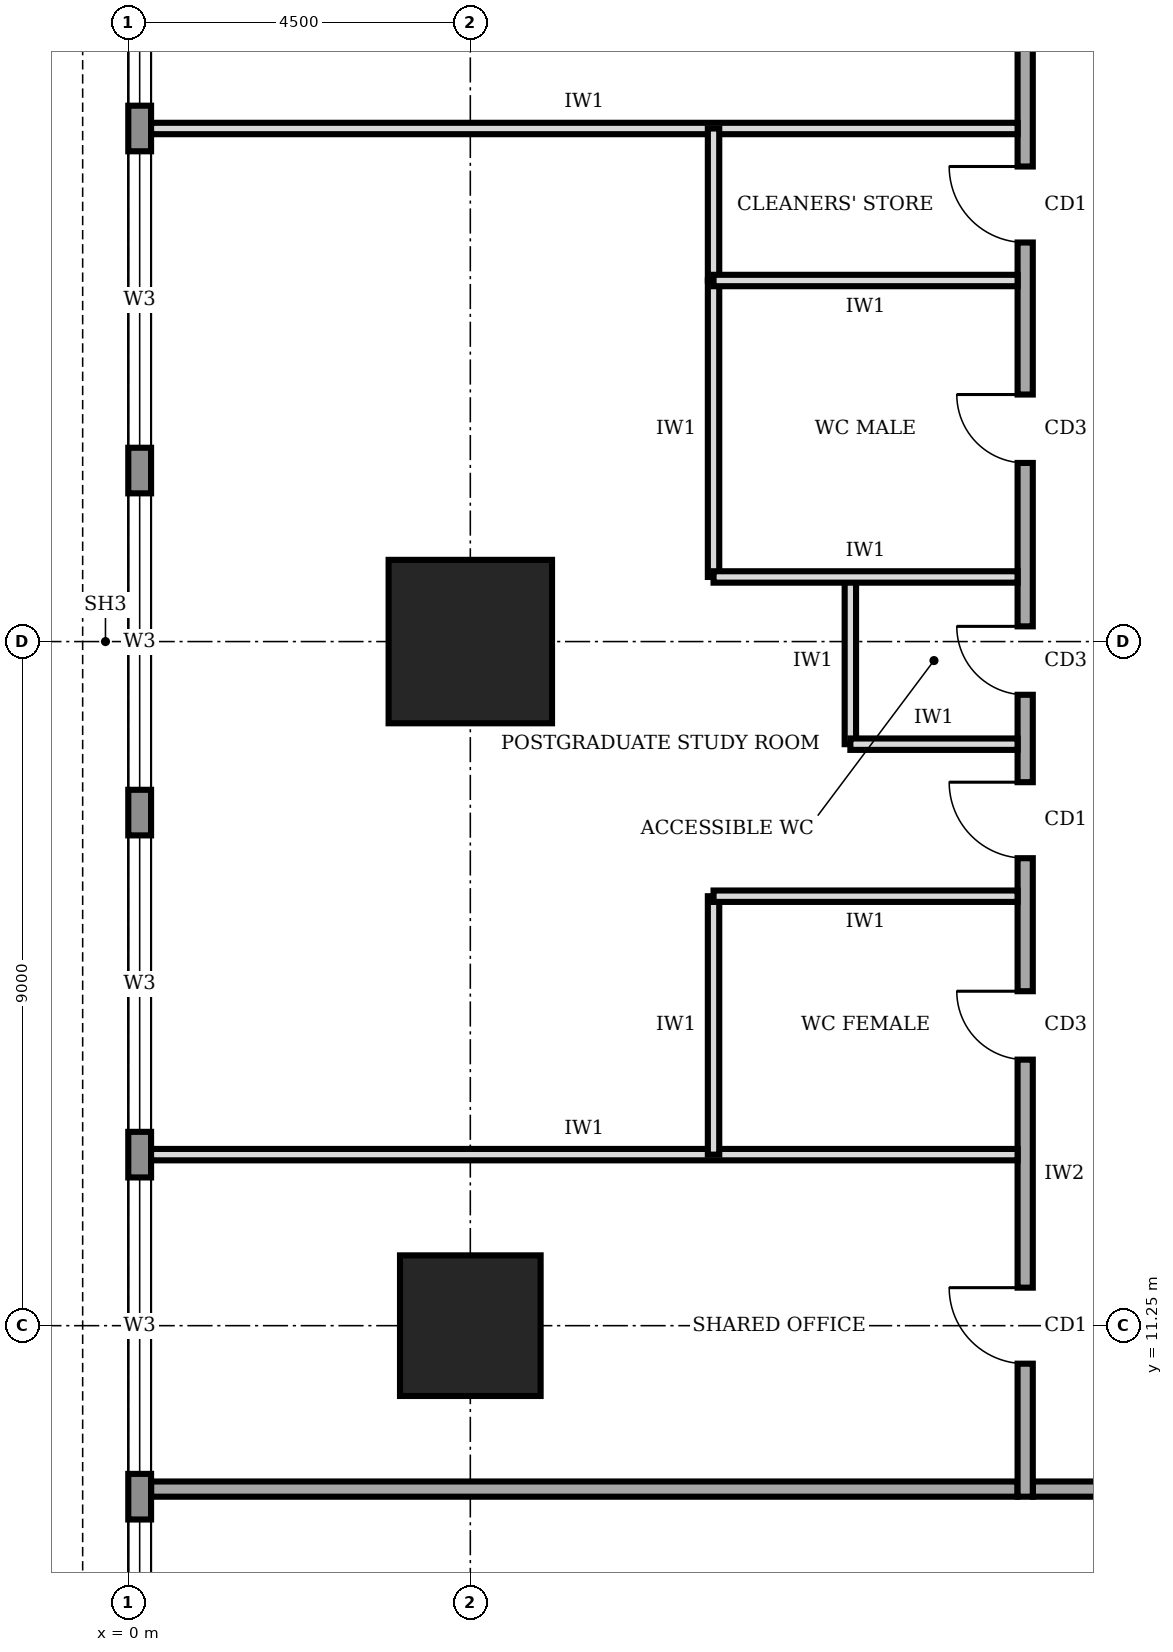
"""IFC4 building model, lengths in metres.
Left out: names, types, materials, properties, quantities, classifications, styles, units other than length and angle.
Written with IfcOpenShell. Run it as: python <this file> out.ifc"""

import sys

from ifc_helpers import new_model, si_unit, direction, frame, frame_2d, origin, origin_2d, place, context, subcontext, project, spatial, rectangle, extrude, element, fill, save


model = new_model("IFC4")
c1 = context("Model", 3, precision=1e-05, world=origin(), true_north=direction((0.0, 1.0)))
c2 = subcontext(c1, "Body", "Model", "MODEL_VIEW")
j1 = project(units=[si_unit("LENGTHUNIT", "METRE"), si_unit("PLANEANGLEUNIT", "RADIAN")], contexts=[c1])
p1 = place(None, origin())
s1 = spatial("IfcSite", under=j1, at=p1, CompositionType="ELEMENT")
p2 = place(p1, origin())
s2 = spatial("IfcBuilding", under=s1, at=p2, CompositionType="ELEMENT")
p3 = place(p2, frame((0.0, 0.0, 253.0)))
s3 = spatial("IfcBuildingStorey", under=s2, at=p3, CompositionType="ELEMENT", Elevation=253.0)
p4 = place(p3, frame((4.5, 11.25, 0.0), z_axis=(0.0, 0.0, 1.0), x_axis=(1.0, 0.0, 0.0)))
e1 = element("IfcColumn", 1, at=p4, inside=s3, PredefinedType="COLUMN", context=c2, shape_type="SweptSolid", body=[
    extrude(rectangle(XDim=1.85, YDim=1.85, at=origin_2d()), origin(), (0.0, 0.0, 1.0), 4.0),
])
p5 = place(p3, frame((4.5, 20.25, 0.0), z_axis=(0.0, 0.0, 1.0), x_axis=(1.0, 0.0, 0.0)))
e2 = element("IfcColumn", 2, at=p5, inside=s3, PredefinedType="COLUMN", context=c2, shape_type="SweptSolid", body=[
    extrude(rectangle(XDim=2.15, YDim=2.15, at=origin_2d()), origin(), (0.0, 0.0, 1.0), 4.0),
])
p6 = place(p3, frame((0.15, 35.98, 0.0), z_axis=(0.0, 0.0, 1.0), x_axis=(0.0, -1.0, 0.0)))
e3 = element("IfcWall", 3, at=p6, inside=s3, PredefinedType="STANDARD", context=c2, shape_type="SweptSolid", body=[
    extrude(rectangle(XDim=31.46, YDim=0.3, at=frame_2d((15.73, 0.0))), origin(), (0.0, 0.0, 1.0), 3.75),
])
p7 = place(p6, frame((27.28, 0.0, 0.95)))
e4 = element("IfcOpeningElement", 4, at=p7, cuts=e3, PredefinedType="OPENING", context=c2, shape_type="SweptSolid", body=[
    extrude(rectangle(XDim=3.9, YDim=1.8, at=frame_2d((1.95, 0.9))), frame((0.0, 0.16, 0.0), z_axis=(0.0, -1.0, 0.0), x_axis=(1.0, 0.0, 0.0)), (0.0, 0.0, 1.0), 0.32),
])
p8 = place(p6, frame((22.78, 0.0, 0.95)))
e5 = element("IfcOpeningElement", 5, at=p8, cuts=e3, PredefinedType="OPENING", context=c2, shape_type="SweptSolid", body=[
    extrude(rectangle(XDim=3.9, YDim=1.8, at=frame_2d((1.95, 0.9))), frame((0.0, 0.16, 0.0), z_axis=(0.0, -1.0, 0.0), x_axis=(1.0, 0.0, 0.0)), (0.0, 0.0, 1.0), 0.32),
])
p9 = place(p6, frame((18.28, 0.0, 0.95)))
e6 = element("IfcOpeningElement", 6, at=p9, cuts=e3, PredefinedType="OPENING", context=c2, shape_type="SweptSolid", body=[
    extrude(rectangle(XDim=3.9, YDim=1.8, at=frame_2d((1.95, 0.9))), frame((0.0, 0.16, 0.0), z_axis=(0.0, -1.0, 0.0), x_axis=(1.0, 0.0, 0.0)), (0.0, 0.0, 1.0), 0.32),
])
p10 = place(p6, frame((13.78, 0.0, 0.95)))
e7 = element("IfcOpeningElement", 7, at=p10, cuts=e3, PredefinedType="OPENING", context=c2, shape_type="SweptSolid", body=[
    extrude(rectangle(XDim=3.9, YDim=1.8, at=frame_2d((1.95, 0.9))), frame((0.0, 0.16, 0.0), z_axis=(0.0, -1.0, 0.0), x_axis=(1.0, 0.0, 0.0)), (0.0, 0.0, 1.0), 0.32),
])
p11 = place(p6, frame((9.28, 0.0, 0.95)))
e8 = element("IfcOpeningElement", 8, at=p11, cuts=e3, PredefinedType="OPENING", context=c2, shape_type="SweptSolid", body=[
    extrude(rectangle(XDim=3.9, YDim=1.8, at=frame_2d((1.95, 0.9))), frame((0.0, 0.16, 0.0), z_axis=(0.0, -1.0, 0.0), x_axis=(1.0, 0.0, 0.0)), (0.0, 0.0, 1.0), 0.32),
])
p12 = place(p6, frame((4.78, 0.0, 0.95)))
e9 = element("IfcOpeningElement", 9, at=p12, cuts=e3, PredefinedType="OPENING", context=c2, shape_type="SweptSolid", body=[
    extrude(rectangle(XDim=3.9, YDim=1.8, at=frame_2d((1.95, 0.9))), frame((0.0, 0.16, 0.0), z_axis=(0.0, -1.0, 0.0), x_axis=(1.0, 0.0, 0.0)), (0.0, 0.0, 1.0), 0.32),
])
p13 = place(p3, frame((11.9, 9.1, 0.0), z_axis=(0.0, 0.0, 1.0), x_axis=(1.0, 0.0, 0.0)))
e10 = element("IfcWall", 10, at=p13, inside=s3, PredefinedType="SOLIDWALL", context=c2, shape_type="SweptSolid", body=[
    extrude(rectangle(XDim=16.9, YDim=0.2, at=frame_2d((8.45, 0.0))), origin(), (0.0, 0.0, 1.0), 3.75),
])
p14 = place(p13, frame((2.25, 0.0, 0.0)))
e11 = element("IfcOpeningElement", 11, at=p14, cuts=e10, PredefinedType="OPENING", context=c2, shape_type="SweptSolid", body=[
    extrude(rectangle(XDim=1.4, YDim=2.1, at=frame_2d((0.7, 1.05))), frame((0.0, 0.11, 0.0), z_axis=(0.0, -1.0, 0.0), x_axis=(1.0, 0.0, 0.0)), (0.0, 0.0, 1.0), 0.22),
])
p15 = place(p13, frame((10.8, 0.0, 0.0)))
e12 = element("IfcOpeningElement", 12, at=p15, cuts=e10, PredefinedType="OPENING", context=c2, shape_type="SweptSolid", body=[
    extrude(rectangle(XDim=1.4, YDim=2.1, at=frame_2d((0.7, 1.05))), frame((0.0, 0.11, 0.0), z_axis=(0.0, -1.0, 0.0), x_axis=(1.0, 0.0, 0.0)), (0.0, 0.0, 1.0), 0.22),
])
p16 = place(p3, frame((11.8, 31.3, 0.0), z_axis=(0.0, 0.0, 1.0), x_axis=(0.0, -1.0, 0.0)))
e13 = element("IfcWall", 13, at=p16, inside=s3, PredefinedType="SOLIDWALL", context=c2, shape_type="SweptSolid", body=[
    extrude(rectangle(XDim=22.3, YDim=0.2, at=frame_2d((11.15, 0.0))), origin(), (0.0, 0.0, 1.0), 3.75),
])
p17 = place(p16, frame((19.55, 0.0, 0.0)))
e14 = element("IfcOpeningElement", 14, at=p17, cuts=e13, PredefinedType="OPENING", context=c2, shape_type="SweptSolid", body=[
    extrude(rectangle(XDim=1.0, YDim=2.1, at=frame_2d((0.5, 1.05))), frame((0.0, 0.11, 0.0), z_axis=(0.0, -1.0, 0.0), x_axis=(1.0, 0.0, 0.0)), (0.0, 0.0, 1.0), 0.22),
])
p18 = place(p16, frame((15.65, 0.0, 0.0)))
e15 = element("IfcOpeningElement", 15, at=p18, cuts=e13, PredefinedType="OPENING", context=c2, shape_type="SweptSolid", body=[
    extrude(rectangle(XDim=0.9, YDim=2.1, at=frame_2d((0.45, 1.05))), frame((0.0, 0.11, 0.0), z_axis=(0.0, -1.0, 0.0), x_axis=(1.0, 0.0, 0.0)), (0.0, 0.0, 1.0), 0.22),
])
p19 = place(p16, frame((10.85, 0.0, 0.0)))
e16 = element("IfcOpeningElement", 16, at=p19, cuts=e13, PredefinedType="OPENING", context=c2, shape_type="SweptSolid", body=[
    extrude(rectangle(XDim=0.9, YDim=2.1, at=frame_2d((0.45, 1.05))), frame((0.0, 0.11, 0.0), z_axis=(0.0, -1.0, 0.0), x_axis=(1.0, 0.0, 0.0)), (0.0, 0.0, 1.0), 0.22),
])
p20 = place(p16, frame((7.8, 0.0, 0.0)))
e17 = element("IfcOpeningElement", 17, at=p20, cuts=e13, PredefinedType="OPENING", context=c2, shape_type="SweptSolid", body=[
    extrude(rectangle(XDim=0.9, YDim=2.1, at=frame_2d((0.45, 1.05))), frame((0.0, 0.11, 0.0), z_axis=(0.0, -1.0, 0.0), x_axis=(1.0, 0.0, 0.0)), (0.0, 0.0, 1.0), 0.22),
])
p21 = place(p16, frame((4.8, 0.0, 0.0)))
e18 = element("IfcOpeningElement", 18, at=p21, cuts=e13, PredefinedType="OPENING", context=c2, shape_type="SweptSolid", body=[
    extrude(rectangle(XDim=1.0, YDim=2.1, at=frame_2d((0.5, 1.05))), frame((0.0, 0.11, 0.0), z_axis=(0.0, -1.0, 0.0), x_axis=(1.0, 0.0, 0.0)), (0.0, 0.0, 1.0), 0.22),
])
p22 = place(p16, frame((12.9, 0.0, 0.0)))
e19 = element("IfcOpeningElement", 19, at=p22, cuts=e13, PredefinedType="OPENING", context=c2, shape_type="SweptSolid", body=[
    extrude(rectangle(XDim=1.0, YDim=2.1, at=frame_2d((0.5, 1.05))), frame((0.0, 0.11, 0.0), z_axis=(0.0, -1.0, 0.0), x_axis=(1.0, 0.0, 0.0)), (0.0, 0.0, 1.0), 0.22),
])
p23 = place(p16, frame((1.55, 0.0, 0.0)))
e20 = element("IfcOpeningElement", 20, at=p23, cuts=e13, PredefinedType="OPENING", context=c2, shape_type="SweptSolid", body=[
    extrude(rectangle(XDim=1.0, YDim=2.1, at=frame_2d((0.5, 1.05))), frame((0.0, 0.11, 0.0), z_axis=(0.0, -1.0, 0.0), x_axis=(1.0, 0.0, 0.0)), (0.0, 0.0, 1.0), 0.22),
])
p24 = place(p3, frame((0.3, 9.1, 0.0), z_axis=(0.0, 0.0, 1.0), x_axis=(1.0, 0.0, 0.0)))
e21 = element("IfcWall", 21, at=p24, inside=s3, PredefinedType="SOLIDWALL", context=c2, shape_type="SweptSolid", body=[
    extrude(rectangle(XDim=11.4, YDim=0.2, at=frame_2d((5.7, 0.0))), origin(), (0.0, 0.0, 1.0), 3.75),
])
for number, where, z_axis, x_axis in (
    (22, (0.3, 13.5, 0.0), (0.0, 0.0, 1.0), (1.0, 0.0, 0.0)),
    (23, (0.3, 27.0, 0.0), (0.0, 0.0, 1.0), (1.0, 0.0, 0.0)),
):
    element("IfcWall", number, at=place(p3, frame(where, z_axis=z_axis, x_axis=x_axis)), inside=s3, PredefinedType="PARTITIONING", context=c2, shape_type="SweptSolid", body=[
        extrude(rectangle(XDim=11.4, YDim=0.15, at=frame_2d((5.7, 0.0))), origin(), (0.0, 0.0, 1.0), 3.75),
    ])
p25 = place(p3, frame((11.7, 16.9, 0.0), z_axis=(0.0, 0.0, 1.0), x_axis=(-1.0, 0.0, 0.0)))
e24 = element("IfcWall", 24, at=p25, inside=s3, PredefinedType="PARTITIONING", context=c2, shape_type="SweptSolid", body=[
    extrude(rectangle(XDim=4.0, YDim=0.15, at=frame_2d((2.0, 0.0))), origin(), (0.0, 0.0, 1.0), 3.75),
])
p26 = place(p3, frame((11.7, 18.9, 0.0), z_axis=(0.0, 0.0, 1.0), x_axis=(-1.0, 0.0, 0.0)))
e25 = element("IfcWall", 25, at=p26, inside=s3, PredefinedType="PARTITIONING", context=c2, shape_type="SweptSolid", body=[
    extrude(rectangle(XDim=2.2, YDim=0.15, at=frame_2d((1.1, 0.0))), origin(), (0.0, 0.0, 1.0), 3.75),
])
p27 = place(p3, frame((11.7, 21.1, 0.0), z_axis=(0.0, 0.0, 1.0), x_axis=(-1.0, 0.0, 0.0)))
e26 = element("IfcWall", 26, at=p27, inside=s3, PredefinedType="PARTITIONING", context=c2, shape_type="SweptSolid", body=[
    extrude(rectangle(XDim=4.0, YDim=0.15, at=frame_2d((2.0, 0.0))), origin(), (0.0, 0.0, 1.0), 2.85),
])
p28 = place(p3, frame((11.7, 25.0, 0.0), z_axis=(0.0, 0.0, 1.0), x_axis=(-1.0, 0.0, 0.0)))
e27 = element("IfcWall", 27, at=p28, inside=s3, PredefinedType="PARTITIONING", context=c2, shape_type="SweptSolid", body=[
    extrude(rectangle(XDim=4.0, YDim=0.15, at=frame_2d((2.0, 0.0))), origin(), (0.0, 0.0, 1.0), 3.75),
])
p29 = place(p3, frame((7.7, 13.5, 0.0), z_axis=(0.0, 0.0, 1.0), x_axis=(0.0, 1.0, 0.0)))
e28 = element("IfcWall", 28, at=p29, inside=s3, PredefinedType="PARTITIONING", context=c2, shape_type="SweptSolid", body=[
    extrude(rectangle(XDim=3.4, YDim=0.15, at=frame_2d((1.7, 0.0))), origin(), (0.0, 0.0, 1.0), 3.75),
])
p30 = place(p3, frame((9.5, 18.9, 0.0), z_axis=(0.0, 0.0, 1.0), x_axis=(0.0, 1.0, 0.0)))
e29 = element("IfcWall", 29, at=p30, inside=s3, PredefinedType="PARTITIONING", context=c2, shape_type="SweptSolid", body=[
    extrude(rectangle(XDim=2.2, YDim=0.15, at=frame_2d((1.1, 0.0))), origin(), (0.0, 0.0, 1.0), 3.75),
])
p31 = place(p3, frame((7.7, 21.1, 0.0), z_axis=(0.0, 0.0, 1.0), x_axis=(0.0, 1.0, 0.0)))
e30 = element("IfcWall", 30, at=p31, inside=s3, PredefinedType="PARTITIONING", context=c2, shape_type="SweptSolid", body=[
    extrude(rectangle(XDim=3.9, YDim=0.15, at=frame_2d((1.95, 0.0))), origin(), (0.0, 0.0, 1.0), 3.75),
])
p32 = place(p3, frame((7.7, 25.0, 0.0), z_axis=(0.0, 0.0, 1.0), x_axis=(0.0, 1.0, 0.0)))
e31 = element("IfcWall", 31, at=p32, inside=s3, PredefinedType="PARTITIONING", context=c2, shape_type="SweptSolid", body=[
    extrude(rectangle(XDim=2.0, YDim=0.15, at=frame_2d((1.0, 0.0))), origin(), (0.0, 0.0, 1.0), 3.75),
])
p33 = place(p7, origin())
e32 = element("IfcWindow", 32, at=p33, inside=s3, PartitioningType="SINGLE_PANEL", PredefinedType="WINDOW", context=c2, shape_type="SweptSolid", body=[
    extrude(rectangle(XDim=3.9, YDim=1.8, at=frame_2d((1.95, 0.9))), frame((0.0, 0.03, 0.0), z_axis=(0.0, -1.0, 0.0), x_axis=(1.0, 0.0, 0.0)), (0.0, 0.0, 1.0), 0.06),
])
fill(e4, e32)
p34 = place(p8, origin())
e33 = element("IfcWindow", 33, at=p34, inside=s3, PartitioningType="SINGLE_PANEL", PredefinedType="WINDOW", context=c2, shape_type="SweptSolid", body=[
    extrude(rectangle(XDim=3.9, YDim=1.8, at=frame_2d((1.95, 0.9))), frame((0.0, 0.03, 0.0), z_axis=(0.0, -1.0, 0.0), x_axis=(1.0, 0.0, 0.0)), (0.0, 0.0, 1.0), 0.06),
])
fill(e5, e33)
p35 = place(p9, origin())
e34 = element("IfcWindow", 34, at=p35, inside=s3, PartitioningType="SINGLE_PANEL", PredefinedType="WINDOW", context=c2, shape_type="SweptSolid", body=[
    extrude(rectangle(XDim=3.9, YDim=1.8, at=frame_2d((1.95, 0.9))), frame((0.0, 0.03, 0.0), z_axis=(0.0, -1.0, 0.0), x_axis=(1.0, 0.0, 0.0)), (0.0, 0.0, 1.0), 0.06),
])
fill(e6, e34)
p36 = place(p10, origin())
e35 = element("IfcWindow", 35, at=p36, inside=s3, PartitioningType="SINGLE_PANEL", PredefinedType="WINDOW", context=c2, shape_type="SweptSolid", body=[
    extrude(rectangle(XDim=3.9, YDim=1.8, at=frame_2d((1.95, 0.9))), frame((0.0, 0.03, 0.0), z_axis=(0.0, -1.0, 0.0), x_axis=(1.0, 0.0, 0.0)), (0.0, 0.0, 1.0), 0.06),
])
fill(e7, e35)
p37 = place(p11, origin())
e36 = element("IfcWindow", 36, at=p37, inside=s3, PartitioningType="SINGLE_PANEL", PredefinedType="WINDOW", context=c2, shape_type="SweptSolid", body=[
    extrude(rectangle(XDim=3.9, YDim=1.8, at=frame_2d((1.95, 0.9))), frame((0.0, 0.03, 0.0), z_axis=(0.0, -1.0, 0.0), x_axis=(1.0, 0.0, 0.0)), (0.0, 0.0, 1.0), 0.06),
])
fill(e8, e36)
p38 = place(p12, origin())
e37 = element("IfcWindow", 37, at=p38, inside=s3, PartitioningType="SINGLE_PANEL", PredefinedType="WINDOW", context=c2, shape_type="SweptSolid", body=[
    extrude(rectangle(XDim=3.9, YDim=1.8, at=frame_2d((1.95, 0.9))), frame((0.0, 0.03, 0.0), z_axis=(0.0, -1.0, 0.0), x_axis=(1.0, 0.0, 0.0)), (0.0, 0.0, 1.0), 0.06),
])
fill(e9, e37)
p39 = place(p17, frame((1.0, 0.0, 0.0), z_axis=(0.0, 0.0, 1.0), x_axis=(-1.0, 0.0, 0.0)))
e38 = element("IfcDoor", 38, at=p39, inside=s3, OperationType="SINGLE_SWING_RIGHT", PredefinedType="DOOR", context=c2, shape_type="SweptSolid", body=[
    extrude(rectangle(XDim=1.0, YDim=2.1, at=frame_2d((0.5, 1.05))), frame((0.0, 0.025, 0.0), z_axis=(0.0, -1.0, 0.0), x_axis=(1.0, 0.0, 0.0)), (0.0, 0.0, 1.0), 0.05),
])
fill(e14, e38)
p40 = place(p18, frame((0.9, 0.0, 0.0), z_axis=(0.0, 0.0, 1.0), x_axis=(-1.0, 0.0, 0.0)))
e39 = element("IfcDoor", 39, at=p40, inside=s3, OperationType="SINGLE_SWING_RIGHT", PredefinedType="DOOR", context=c2, shape_type="SweptSolid", body=[
    extrude(rectangle(XDim=0.9, YDim=2.1, at=frame_2d((0.45, 1.05))), frame((0.0, 0.025, 0.0), z_axis=(0.0, -1.0, 0.0), x_axis=(1.0, 0.0, 0.0)), (0.0, 0.0, 1.0), 0.05),
])
fill(e15, e39)
p41 = place(p19, frame((0.9, 0.0, 0.0), z_axis=(0.0, 0.0, 1.0), x_axis=(-1.0, 0.0, 0.0)))
e40 = element("IfcDoor", 40, at=p41, inside=s3, OperationType="SINGLE_SWING_RIGHT", PredefinedType="DOOR", context=c2, shape_type="SweptSolid", body=[
    extrude(rectangle(XDim=0.9, YDim=2.1, at=frame_2d((0.45, 1.05))), frame((0.0, 0.025, 0.0), z_axis=(0.0, -1.0, 0.0), x_axis=(1.0, 0.0, 0.0)), (0.0, 0.0, 1.0), 0.05),
])
fill(e16, e40)
p42 = place(p20, frame((0.9, 0.0, 0.0), z_axis=(0.0, 0.0, 1.0), x_axis=(-1.0, 0.0, 0.0)))
e41 = element("IfcDoor", 41, at=p42, inside=s3, OperationType="SINGLE_SWING_RIGHT", PredefinedType="DOOR", context=c2, shape_type="SweptSolid", body=[
    extrude(rectangle(XDim=0.9, YDim=2.1, at=frame_2d((0.45, 1.05))), frame((0.0, 0.025, 0.0), z_axis=(0.0, -1.0, 0.0), x_axis=(1.0, 0.0, 0.0)), (0.0, 0.0, 1.0), 0.05),
])
fill(e17, e41)
p43 = place(p21, frame((1.0, 0.0, 0.0), z_axis=(0.0, 0.0, 1.0), x_axis=(-1.0, 0.0, 0.0)))
e42 = element("IfcDoor", 42, at=p43, inside=s3, OperationType="SINGLE_SWING_RIGHT", PredefinedType="DOOR", context=c2, shape_type="SweptSolid", body=[
    extrude(rectangle(XDim=1.0, YDim=2.1, at=frame_2d((0.5, 1.05))), frame((0.0, 0.025, 0.0), z_axis=(0.0, -1.0, 0.0), x_axis=(1.0, 0.0, 0.0)), (0.0, 0.0, 1.0), 0.05),
])
fill(e18, e42)
p44 = place(p22, frame((1.0, 0.0, 0.0), z_axis=(0.0, 0.0, 1.0), x_axis=(-1.0, 0.0, 0.0)))
e43 = element("IfcDoor", 43, at=p44, inside=s3, OperationType="SINGLE_SWING_RIGHT", PredefinedType="DOOR", context=c2, shape_type="SweptSolid", body=[
    extrude(rectangle(XDim=1.0, YDim=2.1, at=frame_2d((0.5, 1.05))), frame((0.0, 0.025, 0.0), z_axis=(0.0, -1.0, 0.0), x_axis=(1.0, 0.0, 0.0)), (0.0, 0.0, 1.0), 0.05),
])
fill(e19, e43)
save(model, sys.argv[1])
